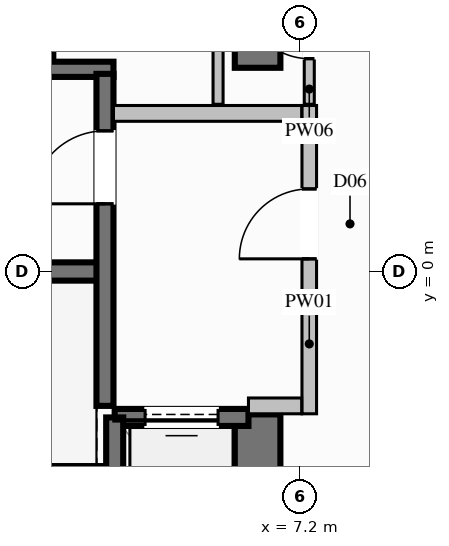
"""IFC4 building model, lengths in metres.
Left out: names, types, materials, properties, quantities, classifications, styles, units other than length and angle.
Written with IfcOpenShell. Run it as: python <this file> out.ifc"""

import sys

from ifc_helpers import new_model, si_unit, direction, frame, frame_2d, origin, place, context, subcontext, project, spatial, rectangle, extrude, element, fill, save


model = new_model("IFC4")
c1 = context("Model", 3, precision=1e-05, world=origin(), true_north=direction((0.0, 1.0)))
c2 = subcontext(c1, "Body", "Model", "MODEL_VIEW")
j1 = project(units=[si_unit("LENGTHUNIT", "METRE"), si_unit("PLANEANGLEUNIT", "RADIAN")], contexts=[c1])
p1 = place(None, origin())
s1 = spatial("IfcSite", under=j1, at=p1, CompositionType="ELEMENT")
p2 = place(p1, origin())
s2 = spatial("IfcBuilding", under=s1, at=p2, CompositionType="ELEMENT")
p3 = place(p2, frame((0.0, 0.0, 78.8)))
s3 = spatial("IfcBuildingStorey", under=s2, at=p3, CompositionType="ELEMENT", Elevation=78.8)
p4 = place(p3, frame((-3.99, 0.0, 0.0), z_axis=(0.0, 0.0, 1.0), x_axis=(1.0, 0.0, 0.0)))
e1 = element("IfcWall", 1, at=p4, inside=s3, PredefinedType="SHEAR", context=c2, shape_type="SweptSolid", body=[
    extrude(rectangle(XDim=7.98, YDim=0.3, at=frame_2d((3.99, 0.0))), origin(), (0.0, 0.0, 1.0), 3.6),
])
for number, where, z_axis, x_axis in (
    (2, (-4.13, -3.325, 0.0), (0.0, 0.0, 1.0), (1.0, 0.0, 0.0)),
    (3, (-4.13, 3.325, 0.0), (0.0, 0.0, 1.0), (1.0, 0.0, 0.0)),
):
    element("IfcWall", number, at=place(p3, frame(where, z_axis=z_axis, x_axis=x_axis)), inside=s3, PredefinedType="SOLIDWALL", context=c2, shape_type="SweptSolid", body=[
        extrude(rectangle(XDim=8.26, YDim=0.25, at=frame_2d((4.13, 0.0))), origin(), (0.0, 0.0, 1.0), 3.6),
    ])
p5 = place(p3, frame((6.5, -6.475, 0.0), z_axis=(0.0, 0.0, 1.0), x_axis=(0.0, 1.0, 0.0)))
e4 = element("IfcWall", 4, at=p5, inside=s3, PredefinedType="SHEAR", context=c2, shape_type="SweptSolid", body=[
    extrude(rectangle(XDim=4.125, YDim=0.75, at=frame_2d((2.062, 0.0))), origin(), (0.0, 0.0, 1.0), 3.6),
])
p6 = place(p3, frame((6.5, 3.35, 0.0), z_axis=(0.0, 0.0, 1.0), x_axis=(0.0, 1.0, 0.0)))
e5 = element("IfcWall", 5, at=p6, inside=s3, PredefinedType="SHEAR", context=c2, shape_type="SweptSolid", body=[
    extrude(rectangle(XDim=3.125, YDim=0.75, at=frame_2d((1.562, 0.0))), origin(), (0.0, 0.0, 1.0), 3.6),
])
p7 = place(p3, frame((3.0, 3.5, 0.0), z_axis=(0.0, 0.0, 1.0), x_axis=(0.0, 1.0, 0.0)))
e6 = element("IfcWall", 6, at=p7, inside=s3, PredefinedType="SOLIDWALL", context=c2, shape_type="SweptSolid", body=[
    extrude(rectangle(XDim=2.5, YDim=0.28, at=frame_2d((1.25, 0.0))), origin(), (0.0, 0.0, 1.0), 3.34),
])
p8 = place(p3, frame((6.35, -2.4, 0.0), z_axis=(0.0, 0.0, 1.0), x_axis=(-1.0, 0.0, 0.0)))
e7 = element("IfcWall", 7, at=p8, inside=s3, PredefinedType="SOLIDWALL", context=c2, shape_type="SweptSolid", body=[
    extrude(rectangle(XDim=2.2, YDim=0.28, at=frame_2d((1.1, 0.0))), origin(), (0.0, 0.0, 1.0), 3.34),
])
p9 = place(p8, frame((0.5, 0.0, 0.0)))
e8 = element("IfcOpeningElement", 8, at=p9, cuts=e7, PredefinedType="OPENING", context=c2, shape_type="SweptSolid", body=[
    extrude(rectangle(XDim=1.2, YDim=2.2, at=frame_2d((0.6, 1.1))), frame((0.0, 0.15, 0.0), z_axis=(0.0, -1.0, 0.0), x_axis=(1.0, 0.0, 0.0)), (0.0, 0.0, 1.0), 0.3),
])
p10 = place(p3, frame((4.15, -2.4, 0.0), z_axis=(0.0, 0.0, 1.0), x_axis=(0.0, -1.0, 0.0)))
e9 = element("IfcWall", 9, at=p10, inside=s3, PredefinedType="SOLIDWALL", context=c2, shape_type="SweptSolid", body=[
    extrude(rectangle(XDim=2.7, YDim=0.28, at=frame_2d((1.35, 0.0))), origin(), (0.0, 0.0, 1.0), 3.34),
])
p11 = place(p3, frame((3.99, -2.21, 0.0), z_axis=(0.0, 0.0, 1.0), x_axis=(0.0, 1.0, 0.0)))
e10 = element("IfcWall", 10, at=p11, inside=s3, PredefinedType="SOLIDWALL", context=c2, shape_type="SweptSolid", body=[
    extrude(rectangle(XDim=5.46, YDim=0.28, at=frame_2d((2.73, 0.0))), origin(), (0.0, 0.0, 1.0), 3.34),
])
p12 = place(p11, frame((3.323, 0.0, 0.0)))
e11 = element("IfcOpeningElement", 11, at=p12, cuts=e10, PredefinedType="OPENING", context=c2, shape_type="SweptSolid", body=[
    extrude(rectangle(XDim=1.2, YDim=2.2, at=frame_2d((0.6, 1.1))), frame((0.0, 0.15, 0.0), z_axis=(0.0, -1.0, 0.0), x_axis=(1.0, 0.0, 0.0)), (0.0, 0.0, 1.0), 0.3),
])
p13 = place(p3, frame((7.35, -2.34, 0.0), z_axis=(0.0, 0.0, 1.0), x_axis=(0.0, 1.0, 0.0)))
e12 = element("IfcWall", 12, at=p13, inside=s3, PredefinedType="PARTITIONING", context=c2, shape_type="SweptSolid", body=[
    extrude(rectangle(XDim=5.07, YDim=0.24, at=frame_2d((2.535, 0.0))), origin(), (0.0, 0.0, 1.0), 2.425),
])
p14 = place(p13, frame((2.548, 0.0, 0.0)))
e13 = element("IfcOpeningElement", 13, at=p14, cuts=e12, PredefinedType="OPENING", context=c2, shape_type="SweptSolid", body=[
    extrude(rectangle(XDim=1.15, YDim=2.2, at=frame_2d((0.575, 1.1))), frame((0.0, 0.13, 0.0), z_axis=(0.0, -1.0, 0.0), x_axis=(1.0, 0.0, 0.0)), (0.0, 0.0, 1.0), 0.26),
])
p15 = place(p3, frame((6.35, -2.21, 0.0), z_axis=(0.0, 0.0, 1.0), x_axis=(1.0, 0.0, 0.0)))
e14 = element("IfcWall", 14, at=p15, inside=s3, PredefinedType="PARTITIONING", context=c2, shape_type="SweptSolid", body=[
    extrude(rectangle(XDim=0.875, YDim=0.26, at=frame_2d((0.438, 0.0))), origin(), (0.0, 0.0, 1.0), 3.34),
])
p16 = place(p3, frame((4.13, 2.6, 0.0), z_axis=(0.0, 0.0, 1.0), x_axis=(1.0, 0.0, 0.0)))
e15 = element("IfcWall", 15, at=p16, inside=s3, PredefinedType="PARTITIONING", context=c2, shape_type="SweptSolid", body=[
    extrude(rectangle(XDim=3.095, YDim=0.26, at=frame_2d((1.548, 0.0))), origin(), (0.0, 0.0, 1.0), 3.34),
])
p17 = place(p3, frame((7.35, 2.75, 0.0), z_axis=(0.0, 0.0, 1.0), x_axis=(0.0, 1.0, 0.0)))
e16 = element("IfcWall", 16, at=p17, inside=s3, PredefinedType="PARTITIONING", context=c2, shape_type="SweptSolid", body=[
    extrude(rectangle(XDim=2.55, YDim=0.165, at=frame_2d((1.275, 0.0))), origin(), (0.0, 0.0, 1.0), 3.34),
])
p18 = place(p17, frame((0.75, 0.0, 0.0)))
e17 = element("IfcOpeningElement", 17, at=p18, cuts=e16, PredefinedType="OPENING", context=c2, shape_type="SweptSolid", body=[
    extrude(rectangle(XDim=1.05, YDim=2.15, at=frame_2d((0.525, 1.075))), frame((0.0, 0.093, 0.0), z_axis=(0.0, -1.0, 0.0), x_axis=(1.0, 0.0, 0.0)), (0.0, 0.0, 1.0), 0.185),
])
p19 = place(p3, frame((5.85, 5.3, 0.0), z_axis=(0.0, 0.0, 1.0), x_axis=(0.0, -1.0, 0.0)))
e18 = element("IfcWall", 18, at=p19, inside=s3, PredefinedType="PARTITIONING", context=c2, shape_type="SweptSolid", body=[
    extrude(rectangle(XDim=2.55, YDim=0.165, at=frame_2d((1.275, 0.0))), origin(), (0.0, 0.0, 1.0), 2.425),
])
p20 = place(p9, origin())
e19 = element("IfcDoor", 19, at=p20, inside=s3, OperationType="SLIDING_TO_LEFT", PredefinedType="DOOR", context=c2, shape_type="SweptSolid", body=[
    extrude(rectangle(XDim=1.2, YDim=2.2, at=frame_2d((0.6, 1.1))), frame((0.0, 0.025, 0.0), z_axis=(0.0, -1.0, 0.0), x_axis=(1.0, 0.0, 0.0)), (0.0, 0.0, 1.0), 0.05),
])
fill(e8, e19)
p21 = place(p12, origin())
e20 = element("IfcDoor", 20, at=p21, inside=s3, OperationType="SINGLE_SWING_LEFT", PredefinedType="DOOR", context=c2, shape_type="SweptSolid", body=[
    extrude(rectangle(XDim=1.2, YDim=2.2, at=frame_2d((0.6, 1.1))), frame((0.0, 0.025, 0.0), z_axis=(0.0, -1.0, 0.0), x_axis=(1.0, 0.0, 0.0)), (0.0, 0.0, 1.0), 0.05),
])
fill(e11, e20)
p22 = place(p14, origin())
e21 = element("IfcDoor", 21, at=p22, inside=s3, OperationType="SINGLE_SWING_LEFT", PredefinedType="DOOR", context=c2, shape_type="SweptSolid", body=[
    extrude(rectangle(XDim=1.15, YDim=2.2, at=frame_2d((0.575, 1.1))), frame((0.0, 0.025, 0.0), z_axis=(0.0, -1.0, 0.0), x_axis=(1.0, 0.0, 0.0)), (0.0, 0.0, 1.0), 0.05),
])
fill(e13, e21)
p23 = place(p18, origin())
e22 = element("IfcDoor", 22, at=p23, inside=s3, OperationType="SINGLE_SWING_RIGHT", PredefinedType="DOOR", context=c2, shape_type="SweptSolid", body=[
    extrude(rectangle(XDim=1.05, YDim=2.15, at=frame_2d((0.525, 1.075))), frame((0.0, 0.025, 0.0), z_axis=(0.0, -1.0, 0.0), x_axis=(1.0, 0.0, 0.0)), (0.0, 0.0, 1.0), 0.05),
])
fill(e17, e22)
save(model, sys.argv[1])
